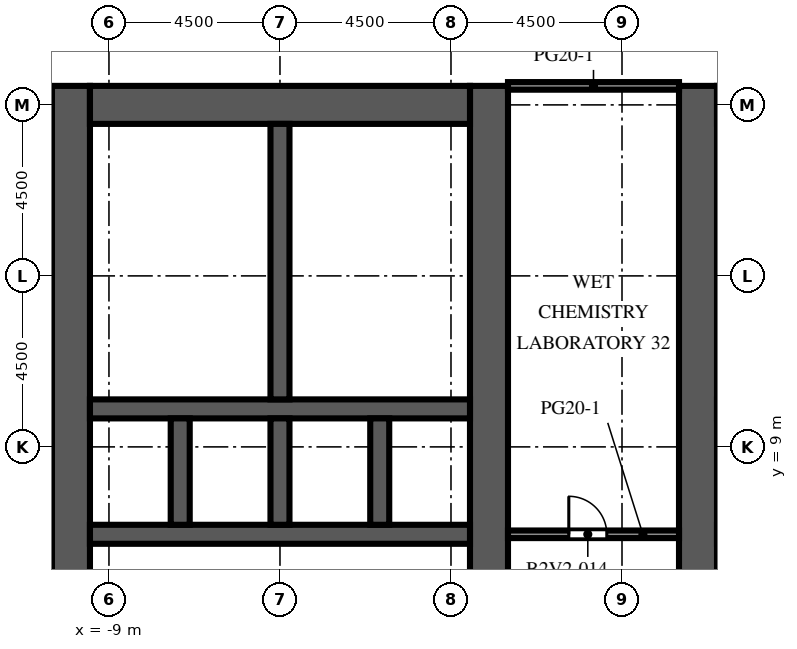
"""IFC4 building model, lengths in metres.
Left out: names, types, materials, properties, quantities, classifications, styles, units other than length and angle.
Written with IfcOpenShell. Run it as: python <this file> out.ifc"""

import sys

from ifc_helpers import new_model, si_unit, direction, frame, frame_2d, origin, place, context, subcontext, project, spatial, rectangle, extrude, element, fill, save


model = new_model("IFC4")
c1 = context("Model", 3, precision=1e-05, world=origin(), true_north=direction((0.0, 1.0)))
c2 = subcontext(c1, "Body", "Model", "MODEL_VIEW")
j1 = project(units=[si_unit("LENGTHUNIT", "METRE"), si_unit("PLANEANGLEUNIT", "RADIAN")], contexts=[c1])
p1 = place(None, origin())
s1 = spatial("IfcSite", under=j1, at=p1, CompositionType="ELEMENT")
p2 = place(p1, origin())
s2 = spatial("IfcBuilding", under=s1, at=p2, CompositionType="ELEMENT")
p3 = place(p2, frame((0.0, 0.0, 62.4)))
s3 = spatial("IfcBuildingStorey", under=s2, at=p3, CompositionType="ELEMENT", Elevation=62.4)
p4 = place(p3, frame((-10.0, -9.0, 0.0), z_axis=(0.0, 0.0, 1.0), x_axis=(0.0, 1.0, 0.0)))
e1 = element("IfcWall", 1, at=p4, inside=s3, PredefinedType="SHEAR", context=c2, shape_type="SweptSolid", body=[
    extrude(rectangle(XDim=27.5, YDim=1.0, at=frame_2d((13.75, 0.0))), origin(), (0.0, 0.0, 1.0), 4.1),
])
p5 = place(p4, frame((12.55, 0.0, 0.0)))
e2 = element("IfcOpeningElement", 2, at=p5, cuts=e1, PredefinedType="OPENING", context=c2, shape_type="SweptSolid", body=[
    extrude(rectangle(XDim=2.4, YDim=2.4, at=frame_2d((1.2, 1.2))), frame((0.0, 0.51, 0.0), z_axis=(0.0, -1.0, 0.0), x_axis=(1.0, 0.0, 0.0)), (0.0, 0.0, 1.0), 1.02),
])
p6 = place(p4, frame((6.825, 0.0, 0.0)))
e3 = element("IfcOpeningElement", 3, at=p6, cuts=e1, PredefinedType="OPENING", context=c2, shape_type="SweptSolid", body=[
    extrude(rectangle(XDim=1.2, YDim=2.1, at=frame_2d((0.6, 1.05))), frame((0.0, 0.51, 0.0), z_axis=(0.0, -1.0, 0.0), x_axis=(1.0, 0.0, 0.0)), (0.0, 0.0, 1.0), 1.02),
])
p7 = place(p4, frame((19.475, 0.0, 0.0)))
e4 = element("IfcOpeningElement", 4, at=p7, cuts=e1, PredefinedType="OPENING", context=c2, shape_type="SweptSolid", body=[
    extrude(rectangle(XDim=1.2, YDim=2.1, at=frame_2d((0.6, 1.05))), frame((0.0, 0.51, 0.0), z_axis=(0.0, -1.0, 0.0), x_axis=(1.0, 0.0, 0.0)), (0.0, 0.0, 1.0), 1.02),
])
p8 = place(p3, frame((1.0, -9.0, 0.0), z_axis=(0.0, 0.0, 1.0), x_axis=(0.0, 1.0, 0.0)))
e5 = element("IfcWall", 5, at=p8, inside=s3, PredefinedType="SHEAR", context=c2, shape_type="SweptSolid", body=[
    extrude(rectangle(XDim=27.5, YDim=1.0, at=frame_2d((13.75, 0.0))), origin(), (0.0, 0.0, 1.0), 4.1),
])
p9 = place(p8, frame((12.55, 0.0, 0.0)))
e6 = element("IfcOpeningElement", 6, at=p9, cuts=e5, PredefinedType="OPENING", context=c2, shape_type="SweptSolid", body=[
    extrude(rectangle(XDim=2.4, YDim=2.4, at=frame_2d((1.2, 1.2))), frame((0.0, 0.51, 0.0), z_axis=(0.0, -1.0, 0.0), x_axis=(1.0, 0.0, 0.0)), (0.0, 0.0, 1.0), 1.02),
])
p10 = place(p8, frame((5.55, 0.0, 0.0)))
e7 = element("IfcOpeningElement", 7, at=p10, cuts=e5, PredefinedType="OPENING", context=c2, shape_type="SweptSolid", body=[
    extrude(rectangle(XDim=0.905, YDim=2.1, at=frame_2d((0.453, 1.05))), frame((0.0, 0.51, 0.0), z_axis=(0.0, -1.0, 0.0), x_axis=(1.0, 0.0, 0.0)), (0.0, 0.0, 1.0), 1.02),
])
p11 = place(p8, frame((23.363, 0.0, 0.0)))
e8 = element("IfcOpeningElement", 8, at=p11, cuts=e5, PredefinedType="OPENING", context=c2, shape_type="SweptSolid", body=[
    extrude(rectangle(XDim=1.2, YDim=2.1, at=frame_2d((0.6, 1.05))), frame((0.0, 0.51, 0.0), z_axis=(0.0, -1.0, 0.0), x_axis=(1.0, 0.0, 0.0)), (0.0, 0.0, 1.0), 1.02),
])
p12 = place(p3, frame((-9.5, 18.0, 0.0), z_axis=(0.0, 0.0, 1.0), x_axis=(1.0, 0.0, 0.0)))
e9 = element("IfcWall", 9, at=p12, inside=s3, PredefinedType="SHEAR", context=c2, shape_type="SweptSolid", body=[
    extrude(rectangle(XDim=10.0, YDim=1.0, at=frame_2d((5.0, 0.0))), origin(), (0.0, 0.0, 1.0), 4.1),
])
p13 = place(p3, frame((-9.5, 6.7, 0.0), z_axis=(0.0, 0.0, 1.0), x_axis=(1.0, 0.0, 0.0)))
e10 = element("IfcWall", 10, at=p13, inside=s3, PredefinedType="SHEAR", context=c2, shape_type="SweptSolid", body=[
    extrude(rectangle(XDim=10.0, YDim=0.5, at=frame_2d((5.0, 0.0))), origin(), (0.0, 0.0, 1.0), 4.1),
])
p14 = place(p13, frame((0.512, 0.0, 0.0)))
e11 = element("IfcOpeningElement", 11, at=p14, cuts=e10, PredefinedType="OPENING", context=c2, shape_type="SweptSolid", body=[
    extrude(rectangle(XDim=1.1, YDim=2.1, at=frame_2d((0.55, 1.05))), frame((0.0, 0.26, 0.0), z_axis=(0.0, -1.0, 0.0), x_axis=(1.0, 0.0, 0.0)), (0.0, 0.0, 1.0), 0.52),
])
p15 = place(p13, frame((3.188, 0.0, 0.0)))
e12 = element("IfcOpeningElement", 12, at=p15, cuts=e10, PredefinedType="OPENING", context=c2, shape_type="SweptSolid", body=[
    extrude(rectangle(XDim=1.0, YDim=2.1, at=frame_2d((0.5, 1.05))), frame((0.0, 0.26, 0.0), z_axis=(0.0, -1.0, 0.0), x_axis=(1.0, 0.0, 0.0)), (0.0, 0.0, 1.0), 0.52),
])
p16 = place(p13, frame((5.812, 0.0, 0.0)))
e13 = element("IfcOpeningElement", 13, at=p16, cuts=e10, PredefinedType="OPENING", context=c2, shape_type="SweptSolid", body=[
    extrude(rectangle(XDim=1.0, YDim=2.1, at=frame_2d((0.5, 1.05))), frame((0.0, 0.26, 0.0), z_axis=(0.0, -1.0, 0.0), x_axis=(1.0, 0.0, 0.0)), (0.0, 0.0, 1.0), 0.52),
])
p17 = place(p13, frame((8.438, 0.0, 0.0)))
e14 = element("IfcOpeningElement", 14, at=p17, cuts=e10, PredefinedType="OPENING", context=c2, shape_type="SweptSolid", body=[
    extrude(rectangle(XDim=1.0, YDim=2.1, at=frame_2d((0.5, 1.05))), frame((0.0, 0.26, 0.0), z_axis=(0.0, -1.0, 0.0), x_axis=(1.0, 0.0, 0.0)), (0.0, 0.0, 1.0), 0.52),
])
p18 = place(p3, frame((-9.5, 10.0, 0.0), z_axis=(0.0, 0.0, 1.0), x_axis=(1.0, 0.0, 0.0)))
e15 = element("IfcWall", 15, at=p18, inside=s3, PredefinedType="SHEAR", context=c2, shape_type="SweptSolid", body=[
    extrude(rectangle(XDim=10.0, YDim=0.5, at=frame_2d((5.0, 0.0))), origin(), (0.0, 0.0, 1.0), 4.1),
])
for number, where, z_axis, x_axis in (
    (16, (-7.125, 6.95, 0.0), (0.0, 0.0, 1.0), (0.0, 1.0, 0.0)),
    (17, (-4.5, 6.95, 0.0), (0.0, 0.0, 1.0), (0.0, 1.0, 0.0)),
    (18, (-1.875, 6.95, 0.0), (0.0, 0.0, 1.0), (0.0, 1.0, 0.0)),
):
    element("IfcWall", number, at=place(p3, frame(where, z_axis=z_axis, x_axis=x_axis)), inside=s3, PredefinedType="SHEAR", context=c2, shape_type="SweptSolid", body=[
        extrude(rectangle(XDim=2.8, YDim=0.5, at=frame_2d((1.4, 0.0))), origin(), (0.0, 0.0, 1.0), 4.1),
    ])
p19 = place(p3, frame((-4.5, 10.25, 0.0), z_axis=(0.0, 0.0, 1.0), x_axis=(0.0, 1.0, 0.0)))
e19 = element("IfcWall", 19, at=p19, inside=s3, PredefinedType="SHEAR", context=c2, shape_type="SweptSolid", body=[
    extrude(rectangle(XDim=7.25, YDim=0.5, at=frame_2d((3.625, 0.0))), origin(), (0.0, 0.0, 1.0), 4.1),
])
p20 = place(p3, frame((6.5, -9.0, 0.0), z_axis=(0.0, 0.0, 1.0), x_axis=(0.0, 1.0, 0.0)))
e20 = element("IfcWall", 20, at=p20, inside=s3, PredefinedType="SHEAR", context=c2, shape_type="SweptSolid", body=[
    extrude(rectangle(XDim=27.5, YDim=1.0, at=frame_2d((13.75, 0.0))), origin(), (0.0, 0.0, 1.0), 4.1),
])
p21 = place(p20, frame((12.55, 0.0, 0.0)))
e21 = element("IfcOpeningElement", 21, at=p21, cuts=e20, PredefinedType="OPENING", context=c2, shape_type="SweptSolid", body=[
    extrude(rectangle(XDim=2.4, YDim=2.4, at=frame_2d((1.2, 1.2))), frame((0.0, 0.51, 0.0), z_axis=(0.0, -1.0, 0.0), x_axis=(1.0, 0.0, 0.0)), (0.0, 0.0, 1.0), 1.02),
])
p22 = place(p20, frame((5.55, 0.0, 0.0)))
e22 = element("IfcOpeningElement", 22, at=p22, cuts=e20, PredefinedType="OPENING", context=c2, shape_type="SweptSolid", body=[
    extrude(rectangle(XDim=0.905, YDim=2.1, at=frame_2d((0.453, 1.05))), frame((0.0, 0.51, 0.0), z_axis=(0.0, -1.0, 0.0), x_axis=(1.0, 0.0, 0.0)), (0.0, 0.0, 1.0), 1.02),
])
p23 = place(p20, frame((23.363, 0.0, 0.0)))
e23 = element("IfcOpeningElement", 23, at=p23, cuts=e20, PredefinedType="OPENING", context=c2, shape_type="SweptSolid", body=[
    extrude(rectangle(XDim=1.2, YDim=2.1, at=frame_2d((0.6, 1.05))), frame((0.0, 0.51, 0.0), z_axis=(0.0, -1.0, 0.0), x_axis=(1.0, 0.0, 0.0)), (0.0, 0.0, 1.0), 1.02),
])
p24 = place(p3, frame((-0.8, 12.425, 0.0), z_axis=(0.0, 0.0, 1.0), x_axis=(1.0, 0.0, 0.0)))
e24 = element("IfcWall", 24, at=p24, inside=s3, PredefinedType="PARTITIONING", context=c2, shape_type="SweptSolid", body=[
    extrude(rectangle(XDim=1.3, YDim=0.1, at=frame_2d((0.65, 0.0))), origin(), (0.0, 0.0, 1.0), 3.65),
])
p25 = place(p24, frame((0.2, 0.0, 0.0)))
e25 = element("IfcOpeningElement", 25, at=p25, cuts=e24, PredefinedType="OPENING", context=c2, shape_type="SweptSolid", body=[
    extrude(rectangle(XDim=0.9, YDim=2.1, at=frame_2d((0.45, 1.05))), frame((0.0, 0.06, 0.0), z_axis=(0.0, -1.0, 0.0), x_axis=(1.0, 0.0, 0.0)), (0.0, 0.0, 1.0), 0.12),
])
p26 = place(p3, frame((-4.25, 12.425, 0.0), z_axis=(0.0, 0.0, 1.0), x_axis=(1.0, 0.0, 0.0)))
e26 = element("IfcWall", 26, at=p26, inside=s3, PredefinedType="PARTITIONING", context=c2, shape_type="SweptSolid", body=[
    extrude(rectangle(XDim=3.45, YDim=0.1, at=frame_2d((1.725, 0.0))), origin(), (0.0, 0.0, 1.0), 3.65),
])
p27 = place(p3, frame((-0.8, 12.425, 0.0), z_axis=(0.0, 0.0, 1.0), x_axis=(0.0, 1.0, 0.0)))
e27 = element("IfcWall", 27, at=p27, inside=s3, PredefinedType="PARTITIONING", context=c2, shape_type="SweptSolid", body=[
    extrude(rectangle(XDim=2.537, YDim=0.1, at=frame_2d((1.269, 0.0))), origin(), (0.0, 0.0, 1.0), 3.65),
])
p28 = place(p27, frame((0.769, 0.0, 0.0)))
e28 = element("IfcOpeningElement", 28, at=p28, cuts=e27, PredefinedType="OPENING", context=c2, shape_type="SweptSolid", body=[
    extrude(rectangle(XDim=1.0, YDim=2.1, at=frame_2d((0.5, 1.05))), frame((0.0, 0.06, 0.0), z_axis=(0.0, -1.0, 0.0), x_axis=(1.0, 0.0, 0.0)), (0.0, 0.0, 1.0), 0.12),
])
p29 = place(p3, frame((-0.8, 14.962, 0.0), z_axis=(0.0, 0.0, 1.0), x_axis=(0.0, 1.0, 0.0)))
e29 = element("IfcWall", 29, at=p29, inside=s3, PredefinedType="PARTITIONING", context=c2, shape_type="SweptSolid", body=[
    extrude(rectangle(XDim=2.538, YDim=0.1, at=frame_2d((1.269, 0.0))), origin(), (0.0, 0.0, 1.0), 3.65),
])
p30 = place(p29, frame((0.769, 0.0, 0.0)))
e30 = element("IfcOpeningElement", 30, at=p30, cuts=e29, PredefinedType="OPENING", context=c2, shape_type="SweptSolid", body=[
    extrude(rectangle(XDim=1.0, YDim=2.1, at=frame_2d((0.5, 1.05))), frame((0.0, 0.06, 0.0), z_axis=(0.0, -1.0, 0.0), x_axis=(1.0, 0.0, 0.0)), (0.0, 0.0, 1.0), 0.12),
])
p31 = place(p3, frame((-4.25, 14.962, 0.0), z_axis=(0.0, 0.0, 1.0), x_axis=(1.0, 0.0, 0.0)))
e31 = element("IfcWall", 31, at=p31, inside=s3, PredefinedType="PARTITIONING", context=c2, shape_type="SweptSolid", body=[
    extrude(rectangle(XDim=3.45, YDim=0.1, at=frame_2d((1.725, 0.0))), origin(), (0.0, 0.0, 1.0), 3.65),
])
p32 = place(p3, frame((7.0, 12.425, 0.0), z_axis=(0.0, 0.0, 1.0), x_axis=(1.0, 0.0, 0.0)))
e32 = element("IfcWall", 32, at=p32, inside=s3, PredefinedType="PARTITIONING", context=c2, shape_type="SweptSolid", body=[
    extrude(rectangle(XDim=1.3, YDim=0.1, at=frame_2d((0.65, 0.0))), origin(), (0.0, 0.0, 1.0), 3.65),
])
p33 = place(p32, frame((0.2, 0.0, 0.0)))
e33 = element("IfcOpeningElement", 33, at=p33, cuts=e32, PredefinedType="OPENING", context=c2, shape_type="SweptSolid", body=[
    extrude(rectangle(XDim=0.9, YDim=2.1, at=frame_2d((0.45, 1.05))), frame((0.0, 0.06, 0.0), z_axis=(0.0, -1.0, 0.0), x_axis=(1.0, 0.0, 0.0)), (0.0, 0.0, 1.0), 0.12),
])
p34 = place(p3, frame((1.5, 6.7, 0.0), z_axis=(0.0, 0.0, 1.0), x_axis=(1.0, 0.0, 0.0)))
e34 = element("IfcWall", 34, at=p34, inside=s3, PredefinedType="PARTITIONING", context=c2, shape_type="SweptSolid", body=[
    extrude(rectangle(XDim=4.5, YDim=0.2, at=frame_2d((2.25, 0.0))), origin(), (0.0, 0.0, 1.0), 3.65),
])
p35 = place(p34, frame((1.6, 0.0, 0.0)))
e35 = element("IfcOpeningElement", 35, at=p35, cuts=e34, PredefinedType="OPENING", context=c2, shape_type="SweptSolid", body=[
    extrude(rectangle(XDim=1.0, YDim=2.1, at=frame_2d((0.5, 1.05))), frame((0.0, 0.11, 0.0), z_axis=(0.0, -1.0, 0.0), x_axis=(1.0, 0.0, 0.0)), (0.0, 0.0, 1.0), 0.22),
])
p36 = place(p3, frame((1.5, 18.5, 0.0), z_axis=(0.0, 0.0, 1.0), x_axis=(1.0, 0.0, 0.0)))
e36 = element("IfcWall", 36, at=p36, inside=s3, PredefinedType="PARTITIONING", context=c2, shape_type="SweptSolid", body=[
    extrude(rectangle(XDim=4.5, YDim=0.2, at=frame_2d((2.25, 0.0))), origin(), (0.0, 0.0, 1.0), 3.65),
])
p37 = place(p14, origin())
e37 = element("IfcDoor", 37, at=p37, inside=s3, OperationType="DOUBLE_DOOR_SLIDING", PredefinedType="DOOR", context=c2, shape_type="SweptSolid", body=[
    extrude(rectangle(XDim=1.1, YDim=2.1, at=frame_2d((0.55, 1.05))), frame((0.0, 0.025, 0.0), z_axis=(0.0, -1.0, 0.0), x_axis=(1.0, 0.0, 0.0)), (0.0, 0.0, 1.0), 0.05),
])
fill(e11, e37)
p38 = place(p5, origin())
e38 = element("IfcDoor", 38, at=p38, inside=s3, OperationType="DOUBLE_DOOR_DOUBLE_SWING", PredefinedType="DOOR", context=c2, shape_type="SweptSolid", body=[
    extrude(rectangle(XDim=2.4, YDim=2.4, at=frame_2d((1.2, 1.2))), frame((0.0, 0.025, 0.0), z_axis=(0.0, -1.0, 0.0), x_axis=(1.0, 0.0, 0.0)), (0.0, 0.0, 1.0), 0.05),
])
fill(e2, e38)
p39 = place(p9, origin())
e39 = element("IfcDoor", 39, at=p39, inside=s3, OperationType="DOUBLE_DOOR_DOUBLE_SWING", PredefinedType="DOOR", context=c2, shape_type="SweptSolid", body=[
    extrude(rectangle(XDim=2.4, YDim=2.4, at=frame_2d((1.2, 1.2))), frame((0.0, 0.025, 0.0), z_axis=(0.0, -1.0, 0.0), x_axis=(1.0, 0.0, 0.0)), (0.0, 0.0, 1.0), 0.05),
])
fill(e6, e39)
p40 = place(p21, origin())
e40 = element("IfcDoor", 40, at=p40, inside=s3, OperationType="DOUBLE_DOOR_DOUBLE_SWING", PredefinedType="DOOR", context=c2, shape_type="SweptSolid", body=[
    extrude(rectangle(XDim=2.4, YDim=2.4, at=frame_2d((1.2, 1.2))), frame((0.0, 0.025, 0.0), z_axis=(0.0, -1.0, 0.0), x_axis=(1.0, 0.0, 0.0)), (0.0, 0.0, 1.0), 0.05),
])
fill(e21, e40)
p41 = place(p7, origin())
e41 = element("IfcDoor", 41, at=p41, inside=s3, OperationType="SINGLE_SWING_LEFT", PredefinedType="DOOR", context=c2, shape_type="SweptSolid", body=[
    extrude(rectangle(XDim=1.2, YDim=2.1, at=frame_2d((0.6, 1.05))), frame((0.0, 0.025, 0.0), z_axis=(0.0, -1.0, 0.0), x_axis=(1.0, 0.0, 0.0)), (0.0, 0.0, 1.0), 0.05),
])
fill(e4, e41)
p42 = place(p15, origin())
e42 = element("IfcDoor", 42, at=p42, inside=s3, OperationType="SINGLE_SWING_RIGHT", PredefinedType="DOOR", context=c2, shape_type="SweptSolid", body=[
    extrude(rectangle(XDim=1.0, YDim=2.1, at=frame_2d((0.5, 1.05))), frame((0.0, 0.025, 0.0), z_axis=(0.0, -1.0, 0.0), x_axis=(1.0, 0.0, 0.0)), (0.0, 0.0, 1.0), 0.05),
])
fill(e12, e42)
p43 = place(p16, origin())
e43 = element("IfcDoor", 43, at=p43, inside=s3, OperationType="SINGLE_SWING_LEFT", PredefinedType="DOOR", context=c2, shape_type="SweptSolid", body=[
    extrude(rectangle(XDim=1.0, YDim=2.1, at=frame_2d((0.5, 1.05))), frame((0.0, 0.025, 0.0), z_axis=(0.0, -1.0, 0.0), x_axis=(1.0, 0.0, 0.0)), (0.0, 0.0, 1.0), 0.05),
])
fill(e13, e43)
p44 = place(p17, origin())
e44 = element("IfcDoor", 44, at=p44, inside=s3, OperationType="SINGLE_SWING_RIGHT", PredefinedType="DOOR", context=c2, shape_type="SweptSolid", body=[
    extrude(rectangle(XDim=1.0, YDim=2.1, at=frame_2d((0.5, 1.05))), frame((0.0, 0.025, 0.0), z_axis=(0.0, -1.0, 0.0), x_axis=(1.0, 0.0, 0.0)), (0.0, 0.0, 1.0), 0.05),
])
fill(e14, e44)
p45 = place(p25, origin())
e45 = element("IfcDoor", 45, at=p45, inside=s3, OperationType="SINGLE_SWING_LEFT", PredefinedType="DOOR", context=c2, shape_type="SweptSolid", body=[
    extrude(rectangle(XDim=0.9, YDim=2.1, at=frame_2d((0.45, 1.05))), frame((0.0, 0.025, 0.0), z_axis=(0.0, -1.0, 0.0), x_axis=(1.0, 0.0, 0.0)), (0.0, 0.0, 1.0), 0.05),
])
fill(e25, e45)
p46 = place(p11, origin())
e46 = element("IfcDoor", 46, at=p46, inside=s3, OperationType="SINGLE_SWING_RIGHT", PredefinedType="DOOR", context=c2, shape_type="SweptSolid", body=[
    extrude(rectangle(XDim=1.2, YDim=2.1, at=frame_2d((0.6, 1.05))), frame((0.0, 0.475, 0.0), z_axis=(0.0, -1.0, 0.0), x_axis=(1.0, 0.0, 0.0)), (0.0, 0.0, 1.0), 0.05),
])
fill(e8, e46)
p47 = place(p28, origin())
e47 = element("IfcDoor", 47, at=p47, inside=s3, OperationType="SINGLE_SWING_LEFT", PredefinedType="DOOR", context=c2, shape_type="SweptSolid", body=[
    extrude(rectangle(XDim=1.0, YDim=2.1, at=frame_2d((0.5, 1.05))), frame((0.0, 0.025, 0.0), z_axis=(0.0, -1.0, 0.0), x_axis=(1.0, 0.0, 0.0)), (0.0, 0.0, 1.0), 0.05),
])
fill(e28, e47)
p48 = place(p30, origin())
e48 = element("IfcDoor", 48, at=p48, inside=s3, OperationType="SINGLE_SWING_RIGHT", PredefinedType="DOOR", context=c2, shape_type="SweptSolid", body=[
    extrude(rectangle(XDim=1.0, YDim=2.1, at=frame_2d((0.5, 1.05))), frame((0.0, 0.025, 0.0), z_axis=(0.0, -1.0, 0.0), x_axis=(1.0, 0.0, 0.0)), (0.0, 0.0, 1.0), 0.05),
])
fill(e30, e48)
p49 = place(p23, origin())
e49 = element("IfcDoor", 49, at=p49, inside=s3, OperationType="SINGLE_SWING_LEFT", PredefinedType="DOOR", context=c2, shape_type="SweptSolid", body=[
    extrude(rectangle(XDim=1.2, YDim=2.1, at=frame_2d((0.6, 1.05))), frame((0.0, -0.425, 0.0), z_axis=(0.0, -1.0, 0.0), x_axis=(1.0, 0.0, 0.0)), (0.0, 0.0, 1.0), 0.05),
])
fill(e23, e49)
p50 = place(p35, origin())
e50 = element("IfcDoor", 50, at=p50, inside=s3, OperationType="SINGLE_SWING_LEFT", PredefinedType="DOOR", context=c2, shape_type="SweptSolid", body=[
    extrude(rectangle(XDim=1.0, YDim=2.1, at=frame_2d((0.5, 1.05))), frame((0.0, 0.025, 0.0), z_axis=(0.0, -1.0, 0.0), x_axis=(1.0, 0.0, 0.0)), (0.0, 0.0, 1.0), 0.05),
])
fill(e35, e50)
save(model, sys.argv[1])
